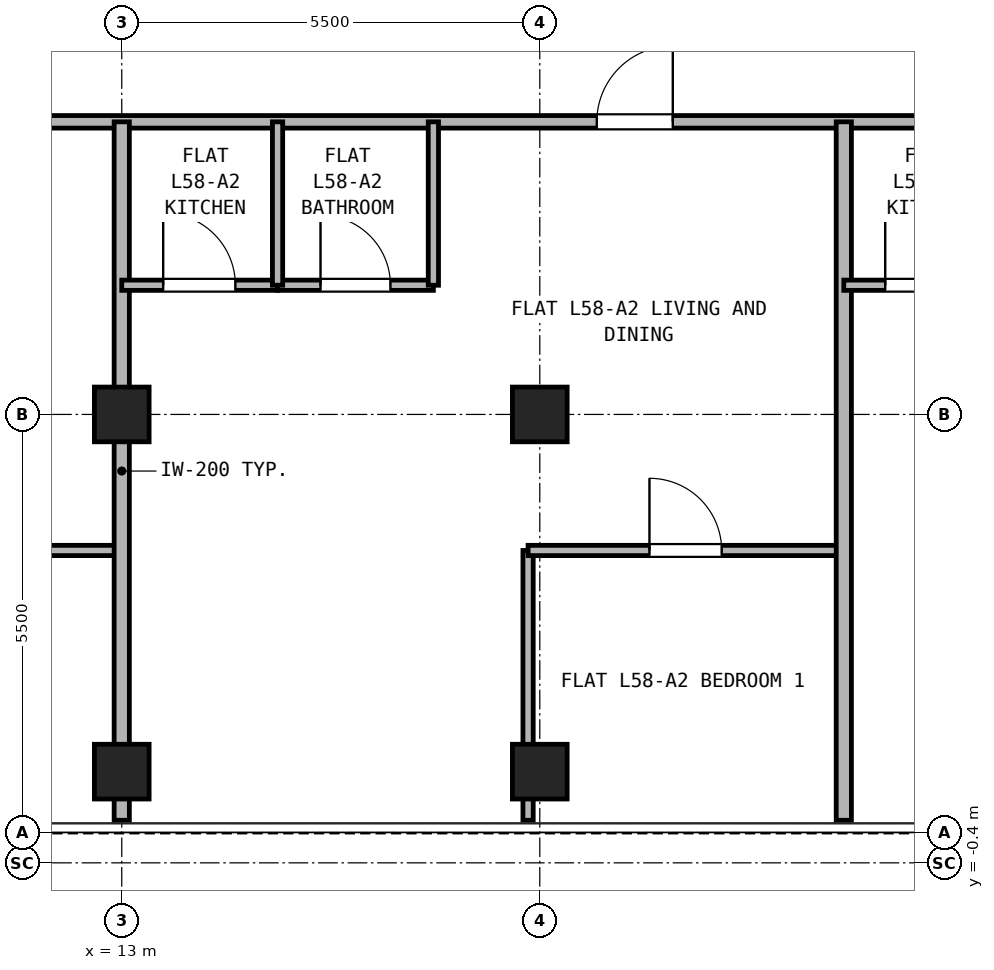
"""IFC4 building model, lengths in metres.
Left out: names, types, materials, properties, quantities, classifications, styles, units other than length and angle.
Written with IfcOpenShell. Run it as: python <this file> out.ifc"""

import sys

from ifc_helpers import new_model, si_unit, direction, frame, frame_2d, origin, origin_2d, place, context, subcontext, project, spatial, rectangle, hollow_rectangle, extrude, source, transform, mapped, element, fill, save


model = new_model("IFC4")
c1 = context("Model", 3, precision=1e-05, world=origin(), true_north=direction((0.0, 1.0)))
c2 = subcontext(c1, "Body", "Model", "MODEL_VIEW")
j1 = project(units=[si_unit("LENGTHUNIT", "METRE"), si_unit("PLANEANGLEUNIT", "RADIAN")], contexts=[c1])
p1 = place(None, origin())
s1 = spatial("IfcSite", under=j1, at=p1, CompositionType="ELEMENT")
p2 = place(p1, origin())
s2 = spatial("IfcBuilding", under=s1, at=p2, CompositionType="ELEMENT")
p3 = place(p2, frame((0.0, 0.0, 206.0)))
s3 = spatial("IfcBuildingStorey", under=s2, at=p3, CompositionType="ELEMENT", Elevation=206.0)
m1 = source(origin(), c2, "Body", "SweptSolid", [
    extrude(hollow_rectangle(XDim=0.72, YDim=0.72, WallThickness=0.04, at=origin_2d()), origin(), (0.0, 0.0, 1.0), 2.95),
])
for number, where, z_axis, x_axis in (
    (1, (13.0, 0.8, 0.0), (0.0, 0.0, 1.0), (1.0, 0.0, 0.0)),
    (2, (18.5, 0.8, 0.0), (0.0, 0.0, 1.0), (1.0, 0.0, 0.0)),
    (3, (13.0, 5.5, 0.0), (0.0, 0.0, 1.0), (1.0, 0.0, 0.0)),
    (4, (18.5, 5.5, 0.0), (0.0, 0.0, 1.0), (1.0, 0.0, 0.0)),
):
    element("IfcColumn", number, at=place(p3, frame(where, z_axis=z_axis, x_axis=x_axis)), inside=s3, PredefinedType="COLUMN", context=c2, shape_type="MappedRepresentation", body=[
        mapped(m1, transform((0.0, 0.0, 0.0), x_axis=(1.0, 0.0, 0.0), y_axis=(0.0, 1.0, 0.0), z_axis=(0.0, 0.0, 1.0), scale=1.0)),
    ])
p4 = place(p3, frame((0.16, 9.35, 0.0), z_axis=(0.0, 0.0, 1.0), x_axis=(1.0, 0.0, 0.0)))
e5 = element("IfcWall", 5, at=p4, inside=s3, PredefinedType="PARTITIONING", context=c2, shape_type="SweptSolid", body=[
    extrude(rectangle(XDim=41.48, YDim=0.165, at=frame_2d((20.74, 0.0))), origin(), (0.0, 0.0, 1.0), 2.95),
])
p5 = place(p4, frame((9.64, 0.0, 0.0)))
e6 = element("IfcOpeningElement", 6, at=p5, cuts=e5, PredefinedType="OPENING", context=c2, shape_type="SweptSolid", body=[
    extrude(rectangle(XDim=1.0, YDim=2.15, at=frame_2d((0.5, 1.075))), frame((0.0, 0.093, 0.0), z_axis=(0.0, -1.0, 0.0), x_axis=(1.0, 0.0, 0.0)), (0.0, 0.0, 1.0), 0.185),
])
p6 = place(p4, frame((19.09, 0.0, 0.0)))
e7 = element("IfcOpeningElement", 7, at=p6, cuts=e5, PredefinedType="OPENING", context=c2, shape_type="SweptSolid", body=[
    extrude(rectangle(XDim=1.0, YDim=2.15, at=frame_2d((0.5, 1.075))), frame((0.0, 0.093, 0.0), z_axis=(0.0, -1.0, 0.0), x_axis=(1.0, 0.0, 0.0)), (0.0, 0.0, 1.0), 0.185),
])
p7 = place(p4, frame((28.34, 0.0, 0.0)))
e8 = element("IfcOpeningElement", 8, at=p7, cuts=e5, PredefinedType="OPENING", context=c2, shape_type="SweptSolid", body=[
    extrude(rectangle(XDim=1.0, YDim=2.15, at=frame_2d((0.5, 1.075))), frame((0.0, 0.093, 0.0), z_axis=(0.0, -1.0, 0.0), x_axis=(1.0, 0.0, 0.0)), (0.0, 0.0, 1.0), 0.185),
])
p8 = place(p4, frame((32.865, 0.0, 0.0)))
e9 = element("IfcOpeningElement", 9, at=p8, cuts=e5, PredefinedType="OPENING", context=c2, shape_type="SweptSolid", body=[
    extrude(rectangle(XDim=1.0, YDim=2.15, at=frame_2d((0.5, 1.075))), frame((0.0, 0.093, 0.0), z_axis=(0.0, -1.0, 0.0), x_axis=(1.0, 0.0, 0.0)), (0.0, 0.0, 1.0), 0.185),
])
p9 = place(p3, frame((7.327, 3.71, 0.0), z_axis=(0.0, 0.0, 1.0), x_axis=(1.0, 0.0, 0.0)))
e10 = element("IfcWall", 10, at=p9, inside=s3, PredefinedType="PARTITIONING", context=c2, shape_type="SweptSolid", body=[
    extrude(rectangle(XDim=5.673, YDim=0.135, at=frame_2d((2.836, 0.0))), origin(), (0.0, 0.0, 1.0), 2.95),
])
p10 = place(p9, frame((2.356, 0.0, 0.0)))
e11 = element("IfcOpeningElement", 11, at=p10, cuts=e10, PredefinedType="OPENING", context=c2, shape_type="SweptSolid", body=[
    extrude(rectangle(XDim=0.95, YDim=2.15, at=frame_2d((0.475, 1.075))), frame((0.0, 0.077, 0.0), z_axis=(0.0, -1.0, 0.0), x_axis=(1.0, 0.0, 0.0)), (0.0, 0.0, 1.0), 0.155),
])
p11 = place(p3, frame((13.0, 0.16, 0.0), z_axis=(0.0, 0.0, 1.0), x_axis=(0.0, 1.0, 0.0)))
e12 = element("IfcWall", 12, at=p11, inside=s3, PredefinedType="PARTITIONING", context=c2, shape_type="SweptSolid", body=[
    extrude(rectangle(XDim=9.19, YDim=0.2, at=frame_2d((4.595, 0.0))), origin(), (0.0, 0.0, 1.0), 2.323),
])
p12 = place(p3, frame((13.0, 7.2, 0.0), z_axis=(0.0, 0.0, 1.0), x_axis=(1.0, 0.0, 0.0)))
e13 = element("IfcWall", 13, at=p12, inside=s3, PredefinedType="PARTITIONING", context=c2, shape_type="SweptSolid", body=[
    extrude(rectangle(XDim=2.05, YDim=0.135, at=frame_2d((1.025, 0.0))), origin(), (0.0, 0.0, 1.0), 2.95),
])
p13 = place(p12, frame((0.545, 0.0, 0.0)))
e14 = element("IfcOpeningElement", 14, at=p13, cuts=e13, PredefinedType="OPENING", context=c2, shape_type="SweptSolid", body=[
    extrude(rectangle(XDim=0.95, YDim=2.15, at=frame_2d((0.475, 1.075))), frame((0.0, 0.077, 0.0), z_axis=(0.0, -1.0, 0.0), x_axis=(1.0, 0.0, 0.0)), (0.0, 0.0, 1.0), 0.155),
])
p14 = place(p3, frame((15.05, 7.2, 0.0), z_axis=(0.0, 0.0, 1.0), x_axis=(1.0, 0.0, 0.0)))
e15 = element("IfcWall", 15, at=p14, inside=s3, PredefinedType="PARTITIONING", context=c2, shape_type="SweptSolid", body=[
    extrude(rectangle(XDim=2.05, YDim=0.135, at=frame_2d((1.025, 0.0))), origin(), (0.0, 0.0, 1.0), 2.95),
])
p15 = place(p14, frame((0.565, 0.0, 0.0)))
e16 = element("IfcOpeningElement", 16, at=p15, cuts=e15, PredefinedType="OPENING", context=c2, shape_type="SweptSolid", body=[
    extrude(rectangle(XDim=0.92, YDim=2.1, at=frame_2d((0.46, 1.05))), frame((0.0, 0.077, 0.0), z_axis=(0.0, -1.0, 0.0), x_axis=(1.0, 0.0, 0.0)), (0.0, 0.0, 1.0), 0.155),
])
for number, where, z_axis, x_axis in (
    (17, (15.05, 7.2, 0.0), (0.0, 0.0, 1.0), (0.0, 1.0, 0.0)),
    (18, (17.1, 7.2, 0.0), (0.0, 0.0, 1.0), (0.0, 1.0, 0.0)),
):
    element("IfcWall", number, at=place(p3, frame(where, z_axis=z_axis, x_axis=x_axis)), inside=s3, PredefinedType="PARTITIONING", context=c2, shape_type="SweptSolid", body=[
        extrude(rectangle(XDim=2.15, YDim=0.135, at=frame_2d((1.075, 0.0))), origin(), (0.0, 0.0, 1.0), 2.95),
    ])
p16 = place(p3, frame((18.346, 0.16, 0.0), z_axis=(0.0, 0.0, 1.0), x_axis=(0.0, 1.0, 0.0)))
e19 = element("IfcWall", 19, at=p16, inside=s3, PredefinedType="PARTITIONING", context=c2, shape_type="SweptSolid", body=[
    extrude(rectangle(XDim=3.55, YDim=0.135, at=frame_2d((1.775, 0.0))), origin(), (0.0, 0.0, 1.0), 2.323),
])
p17 = place(p3, frame((18.346, 3.71, 0.0), z_axis=(0.0, 0.0, 1.0), x_axis=(1.0, 0.0, 0.0)))
e20 = element("IfcWall", 20, at=p17, inside=s3, PredefinedType="PARTITIONING", context=c2, shape_type="SweptSolid", body=[
    extrude(rectangle(XDim=4.154, YDim=0.135, at=frame_2d((2.077, 0.0))), origin(), (0.0, 0.0, 1.0), 2.95),
])
p18 = place(p17, frame((1.597, 0.0, 0.0)))
e21 = element("IfcOpeningElement", 21, at=p18, cuts=e20, PredefinedType="OPENING", context=c2, shape_type="SweptSolid", body=[
    extrude(rectangle(XDim=0.95, YDim=2.15, at=frame_2d((0.475, 1.075))), frame((0.0, 0.077, 0.0), z_axis=(0.0, -1.0, 0.0), x_axis=(1.0, 0.0, 0.0)), (0.0, 0.0, 1.0), 0.155),
])
p19 = place(p3, frame((22.5, 0.16, 0.0), z_axis=(0.0, 0.0, 1.0), x_axis=(0.0, 1.0, 0.0)))
e22 = element("IfcWall", 22, at=p19, inside=s3, PredefinedType="PARTITIONING", context=c2, shape_type="SweptSolid", body=[
    extrude(rectangle(XDim=9.19, YDim=0.2, at=frame_2d((4.595, 0.0))), origin(), (0.0, 0.0, 1.0), 2.95),
])
p20 = place(p3, frame((22.5, 7.2, 0.0), z_axis=(0.0, 0.0, 1.0), x_axis=(1.0, 0.0, 0.0)))
e23 = element("IfcWall", 23, at=p20, inside=s3, PredefinedType="PARTITIONING", context=c2, shape_type="SweptSolid", body=[
    extrude(rectangle(XDim=2.05, YDim=0.135, at=frame_2d((1.025, 0.0))), origin(), (0.0, 0.0, 1.0), 2.95),
])
p21 = place(p20, frame((0.545, 0.0, 0.0)))
e24 = element("IfcOpeningElement", 24, at=p21, cuts=e23, PredefinedType="OPENING", context=c2, shape_type="SweptSolid", body=[
    extrude(rectangle(XDim=0.95, YDim=2.15, at=frame_2d((0.475, 1.075))), frame((0.0, 0.077, 0.0), z_axis=(0.0, -1.0, 0.0), x_axis=(1.0, 0.0, 0.0)), (0.0, 0.0, 1.0), 0.155),
])
p22 = place(p13, origin())
e25 = element("IfcDoor", 25, at=p22, inside=s3, OperationType="SINGLE_SWING_LEFT", PredefinedType="DOOR", context=c2, shape_type="SweptSolid", body=[
    extrude(rectangle(XDim=0.95, YDim=2.15, at=frame_2d((0.475, 1.075))), frame((0.0, 0.025, 0.0), z_axis=(0.0, -1.0, 0.0), x_axis=(1.0, 0.0, 0.0)), (0.0, 0.0, 1.0), 0.05),
])
fill(e14, e25)
p23 = place(p15, origin())
e26 = element("IfcDoor", 26, at=p23, inside=s3, OperationType="SINGLE_SWING_LEFT", PredefinedType="DOOR", context=c2, shape_type="SweptSolid", body=[
    extrude(rectangle(XDim=0.92, YDim=2.1, at=frame_2d((0.46, 1.05))), frame((0.0, 0.025, 0.0), z_axis=(0.0, -1.0, 0.0), x_axis=(1.0, 0.0, 0.0)), (0.0, 0.0, 1.0), 0.05),
])
fill(e16, e26)
p24 = place(p18, frame((0.95, 0.0, 0.0), z_axis=(0.0, 0.0, 1.0), x_axis=(-1.0, 0.0, 0.0)))
e27 = element("IfcDoor", 27, at=p24, inside=s3, OperationType="SINGLE_SWING_LEFT", PredefinedType="DOOR", context=c2, shape_type="SweptSolid", body=[
    extrude(rectangle(XDim=0.95, YDim=2.15, at=frame_2d((0.475, 1.075))), frame((0.0, 0.025, 0.0), z_axis=(0.0, -1.0, 0.0), x_axis=(1.0, 0.0, 0.0)), (0.0, 0.0, 1.0), 0.05),
])
fill(e21, e27)
p25 = place(p6, frame((1.0, 0.0, 0.0), z_axis=(0.0, 0.0, 1.0), x_axis=(-1.0, 0.0, 0.0)))
e28 = element("IfcDoor", 28, at=p25, inside=s3, OperationType="SINGLE_SWING_RIGHT", PredefinedType="DOOR", context=c2, shape_type="SweptSolid", body=[
    extrude(rectangle(XDim=1.0, YDim=2.15, at=frame_2d((0.5, 1.075))), frame((0.0, 0.025, 0.0), z_axis=(0.0, -1.0, 0.0), x_axis=(1.0, 0.0, 0.0)), (0.0, 0.0, 1.0), 0.05),
])
fill(e7, e28)
p26 = place(p21, origin())
e29 = element("IfcDoor", 29, at=p26, inside=s3, OperationType="SINGLE_SWING_LEFT", PredefinedType="DOOR", context=c2, shape_type="SweptSolid", body=[
    extrude(rectangle(XDim=0.95, YDim=2.15, at=frame_2d((0.475, 1.075))), frame((0.0, 0.025, 0.0), z_axis=(0.0, -1.0, 0.0), x_axis=(1.0, 0.0, 0.0)), (0.0, 0.0, 1.0), 0.05),
])
fill(e24, e29)
save(model, sys.argv[1])
